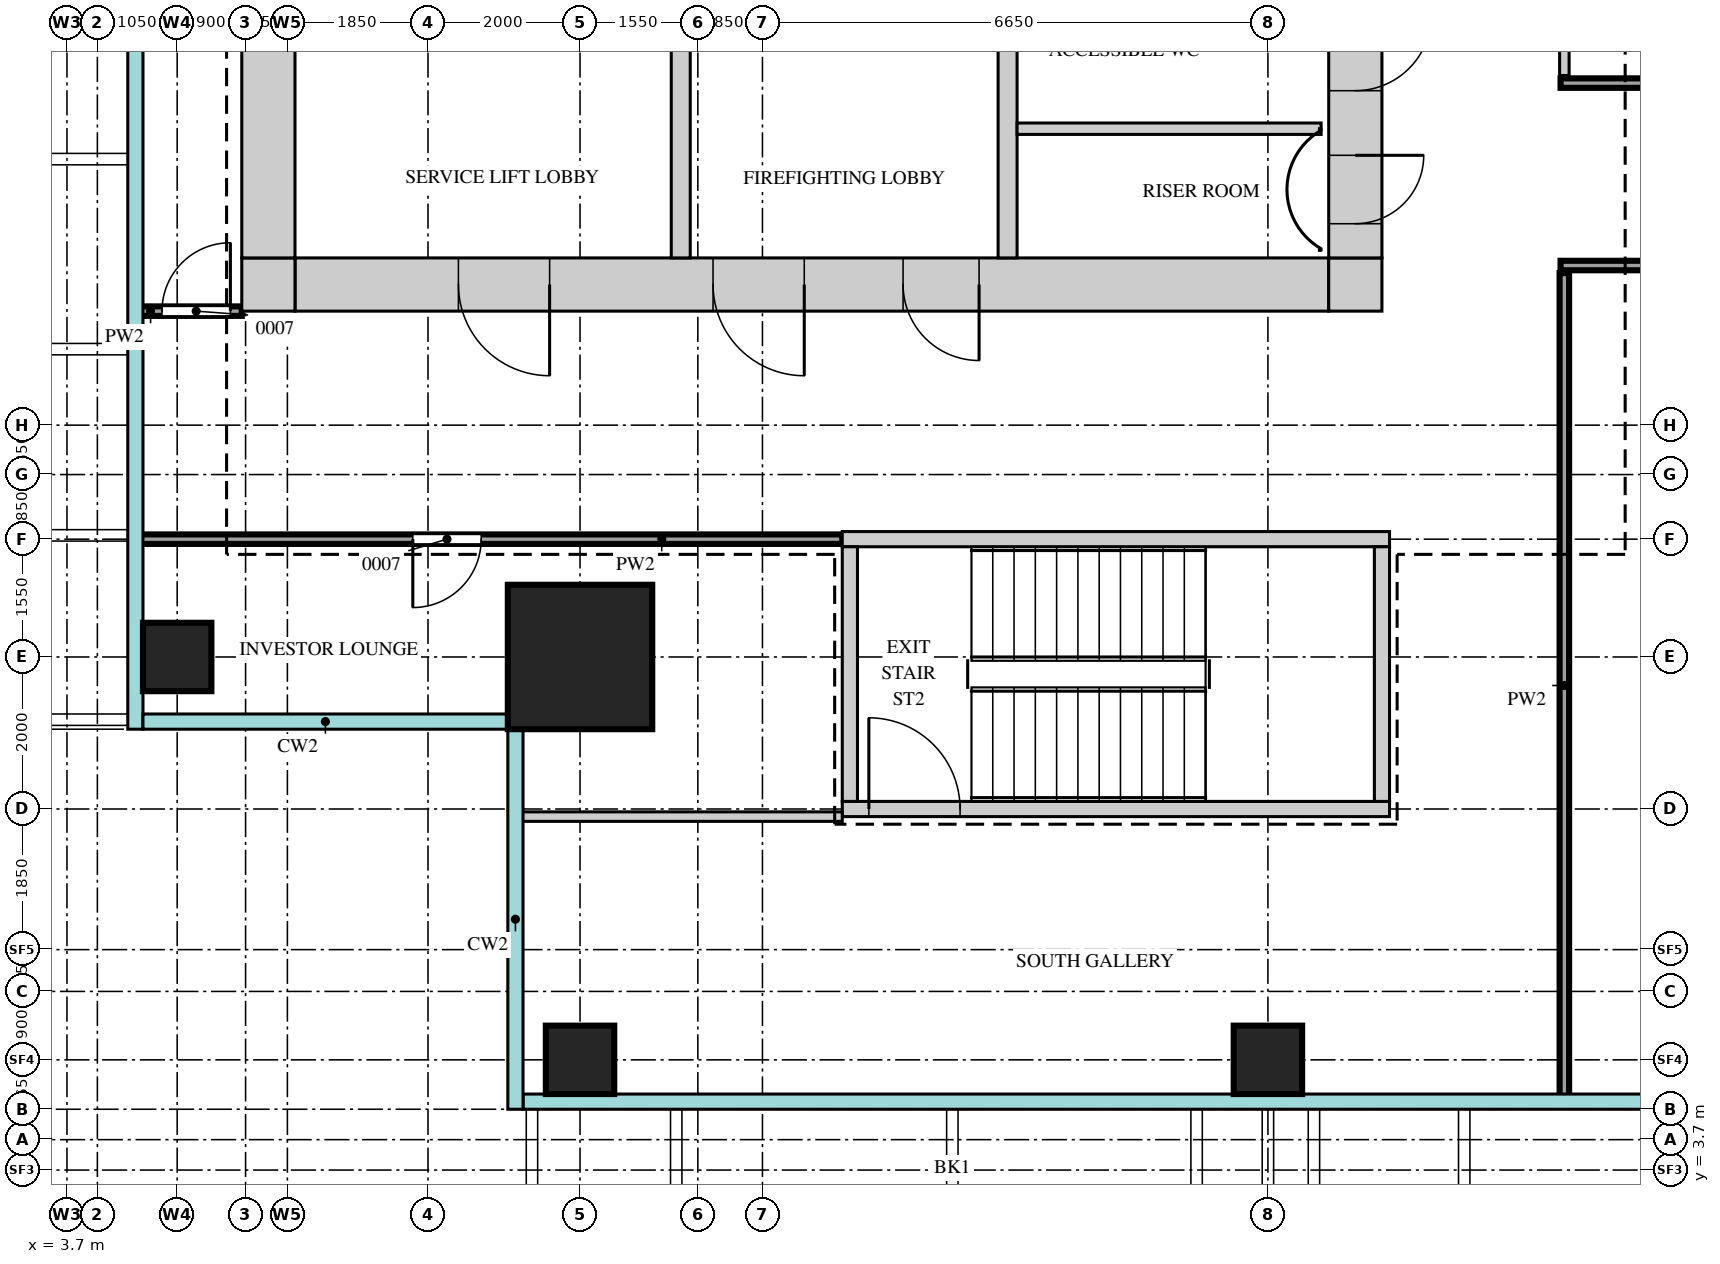
"""IFC4 building model, lengths in metres.
Left out: names, types, materials, properties, quantities, classifications, styles, units other than length and angle.
Written with IfcOpenShell. Run it as: python <this file> out.ifc"""

import sys

from ifc_helpers import new_model, si_unit, direction, frame, frame_2d, origin, origin_2d, place, context, subcontext, project, spatial, rectangle, extrude, source, transform, mapped, element, fill, save


model = new_model("IFC4")
c1 = context("Model", 3, precision=1e-05, world=origin(), true_north=direction((0.0, 1.0)))
c2 = subcontext(c1, "Body", "Model", "MODEL_VIEW")
j1 = project(units=[si_unit("LENGTHUNIT", "METRE"), si_unit("PLANEANGLEUNIT", "RADIAN")], contexts=[c1])
p1 = place(None, origin())
s1 = spatial("IfcSite", under=j1, at=p1, CompositionType="ELEMENT")
p2 = place(p1, origin())
s2 = spatial("IfcBuilding", under=s1, at=p2, CompositionType="ELEMENT")
p3 = place(p2, frame((0.0, 0.0, 234.2)))
s3 = spatial("IfcBuildingStorey", under=s2, at=p3, CompositionType="ELEMENT", Elevation=234.2)
m1 = source(origin(), c2, "Body", "SweptSolid", [
    extrude(rectangle(XDim=13.6, YDim=0.7, at=frame_2d((6.8, 0.0))), origin(), (0.0, 0.0, 1.0), 3.75),
])
p4 = place(p3, frame((6.7, 15.35, 0.0), z_axis=(0.0, 0.0, 1.0), x_axis=(1.0, 0.0, 0.0)))
e1 = element("IfcWall", 1, at=p4, inside=s3, PredefinedType="SHEAR", context=c2, shape_type="MappedRepresentation", body=[
    mapped(m1, transform((0.0, 0.0, 0.0))),
])
m2 = source(origin(), c2, "Body", "SweptSolid", [
    extrude(rectangle(XDim=1.2, YDim=2.1, at=frame_2d((0.6, 1.05))), frame((0.0, 0.36, 0.0), z_axis=(0.0, -1.0, 0.0), x_axis=(1.0, 0.0, 0.0)), (0.0, 0.0, 1.0), 0.72),
])
p5 = place(p4, frame((5.5, 0.0, 0.0)))
e2 = element("IfcOpeningElement", 2, at=p5, cuts=e1, PredefinedType="OPENING", context=c2, shape_type="MappedRepresentation", body=[
    mapped(m2, transform((0.0, 0.0, 0.0))),
])
p6 = place(p4, frame((2.15, 0.0, 0.0)))
e3 = element("IfcOpeningElement", 3, at=p6, cuts=e1, PredefinedType="OPENING", context=c2, shape_type="MappedRepresentation", body=[
    mapped(m2, transform((0.0, 0.0, 0.0))),
])
m3 = source(origin(), c2, "Body", "SweptSolid", [
    extrude(rectangle(XDim=1.0, YDim=2.1, at=frame_2d((0.5, 1.05))), frame((0.0, 0.36, 0.0), z_axis=(0.0, -1.0, 0.0), x_axis=(1.0, 0.0, 0.0)), (0.0, 0.0, 1.0), 0.72),
])
p7 = place(p4, frame((8.0, 0.0, 0.0)))
e4 = element("IfcOpeningElement", 4, at=p7, cuts=e1, PredefinedType="OPENING", context=c2, shape_type="MappedRepresentation", body=[
    mapped(m3, transform((0.0, 0.0, 0.0))),
])
m4 = source(origin(), c2, "Body", "SweptSolid", [
    extrude(rectangle(XDim=0.7, YDim=0.7, at=frame_2d((0.35, 0.0))), origin(), (0.0, 0.0, 1.0), 3.75),
])
for number, where, z_axis, x_axis in (
    (5, (20.3, 15.35, 0.0), (0.0, 0.0, 1.0), (1.0, 0.0, 0.0)),
    (6, (6.0, 15.35, 0.0), (0.0, 0.0, 1.0), (1.0, 0.0, 0.0)),
):
    element("IfcWall", number, at=place(p3, frame(where, z_axis=z_axis, x_axis=x_axis)), inside=s3, PredefinedType="SHEAR", context=c2, shape_type="MappedRepresentation", body=[
        mapped(m4, transform((0.0, 0.0, 0.0))),
    ])
m5 = source(origin(), c2, "Body", "SweptSolid", [
    extrude(rectangle(XDim=22.6, YDim=0.7, at=frame_2d((11.3, 0.0))), origin(), (0.0, 0.0, 1.0), 3.75),
])
p8 = place(p3, frame((20.65, 15.7, 0.0), z_axis=(0.0, 0.0, 1.0), x_axis=(0.0, 1.0, 0.0)))
e7 = element("IfcWall", 7, at=p8, inside=s3, PredefinedType="SHEAR", context=c2, shape_type="MappedRepresentation", body=[
    mapped(m5, transform((0.0, 0.0, 0.0))),
])
m6 = source(origin(), c2, "Body", "SweptSolid", [
    extrude(rectangle(XDim=1.8, YDim=2.1, at=frame_2d((0.9, 1.05))), frame((0.0, 0.36, 0.0), z_axis=(0.0, -1.0, 0.0), x_axis=(1.0, 0.0, 0.0)), (0.0, 0.0, 1.0), 0.72),
])
p9 = place(p8, frame((10.8, 0.0, 0.0)))
e8 = element("IfcOpeningElement", 8, at=p9, cuts=e7, PredefinedType="OPENING", context=c2, shape_type="MappedRepresentation", body=[
    mapped(m6, transform((0.0, 0.0, 0.0))),
])
m7 = source(origin(), c2, "Body", "SweptSolid", [
    extrude(rectangle(XDim=0.9, YDim=2.1, at=frame_2d((0.45, 1.05))), frame((0.0, 0.36, 0.0), z_axis=(0.0, -1.0, 0.0), x_axis=(1.0, 0.0, 0.0)), (0.0, 0.0, 1.0), 0.72),
])
p10 = place(p8, frame((0.45, 0.0, 0.0)))
e9 = element("IfcOpeningElement", 9, at=p10, cuts=e7, PredefinedType="OPENING", context=c2, shape_type="MappedRepresentation", body=[
    mapped(m7, transform((0.0, 0.0, 0.0))),
])
p11 = place(p8, frame((2.2, 0.0, 0.0)))
e10 = element("IfcOpeningElement", 10, at=p11, cuts=e7, PredefinedType="OPENING", context=c2, shape_type="MappedRepresentation", body=[
    mapped(m3, transform((0.0, 0.0, 0.0))),
])
p12 = place(p8, frame((5.0, 0.0, 0.0)))
e11 = element("IfcOpeningElement", 11, at=p12, cuts=e7, PredefinedType="OPENING", context=c2, shape_type="MappedRepresentation", body=[
    mapped(m7, transform((0.0, 0.0, 0.0))),
])
p13 = place(p3, frame((6.35, 15.7, 0.0), z_axis=(0.0, 0.0, 1.0), x_axis=(0.0, 1.0, 0.0)))
e12 = element("IfcWall", 12, at=p13, inside=s3, PredefinedType="SHEAR", context=c2, shape_type="MappedRepresentation", body=[
    mapped(m5, transform((0.0, 0.0, 0.0))),
])
m8 = source(origin(), c2, "Body", "SweptSolid", [
    extrude(rectangle(XDim=7.2, YDim=0.2, at=frame_2d((3.6, 0.0))), origin(), (0.0, 0.0, 1.0), 3.75),
])
p14 = place(p3, frame((13.9, 12.0, 0.0), z_axis=(0.0, 0.0, 1.0), x_axis=(1.0, 0.0, 0.0)))
e13 = element("IfcWall", 13, at=p14, inside=s3, PredefinedType="SHEAR", context=c2, shape_type="MappedRepresentation", body=[
    mapped(m8, transform((0.0, 0.0, 0.0))),
])
p15 = place(p3, frame((13.9, 8.45, 0.0), z_axis=(0.0, 0.0, 1.0), x_axis=(1.0, 0.0, 0.0)))
e14 = element("IfcWall", 14, at=p15, inside=s3, PredefinedType="SHEAR", context=c2, shape_type="MappedRepresentation", body=[
    mapped(m8, transform((0.0, 0.0, 0.0))),
])
m9 = source(origin(), c2, "Body", "SweptSolid", [
    extrude(rectangle(XDim=1.2, YDim=2.1, at=frame_2d((0.6, 1.05))), frame((0.0, 0.11, 0.0), z_axis=(0.0, -1.0, 0.0), x_axis=(1.0, 0.0, 0.0)), (0.0, 0.0, 1.0), 0.22),
])
p16 = place(p15, frame((0.35, 0.0, 0.0)))
e15 = element("IfcOpeningElement", 15, at=p16, cuts=e14, PredefinedType="OPENING", context=c2, shape_type="MappedRepresentation", body=[
    mapped(m9, transform((0.0, 0.0, 0.0))),
])
m10 = source(origin(), c2, "Body", "SweptSolid", [
    extrude(rectangle(XDim=3.35, YDim=0.2, at=frame_2d((1.675, 0.0))), origin(), (0.0, 0.0, 1.0), 3.75),
])
for number, where, z_axis, x_axis in (
    (16, (21.0, 8.55, 0.0), (0.0, 0.0, 1.0), (0.0, 1.0, 0.0)),
    (17, (14.0, 8.55, 0.0), (0.0, 0.0, 1.0), (0.0, 1.0, 0.0)),
):
    element("IfcWall", number, at=place(p3, frame(where, z_axis=z_axis, x_axis=x_axis)), inside=s3, PredefinedType="SHEAR", context=c2, shape_type="MappedRepresentation", body=[
        mapped(m10, transform((0.0, 0.0, 0.0))),
    ])
m11 = source(origin(), c2, "Body", "SweptSolid", [
    extrude(rectangle(XDim=3.5, YDim=0.25, at=frame_2d((1.75, 0.0))), origin(), (0.0, 0.0, 1.0), 3.75),
])
for number, where, z_axis, x_axis in (
    (18, (16.075, 15.7, 0.0), (0.0, 0.0, 1.0), (0.0, 1.0, 0.0)),
    (19, (11.775, 15.7, 0.0), (0.0, 0.0, 1.0), (0.0, 1.0, 0.0)),
):
    element("IfcWall", number, at=place(p3, frame(where, z_axis=z_axis, x_axis=x_axis)), inside=s3, PredefinedType="STANDARD", context=c2, shape_type="MappedRepresentation", body=[
        mapped(m11, transform((0.0, 0.0, 0.0))),
    ])
m12 = source(origin(), c2, "Body", "SweptSolid", [
    extrude(rectangle(XDim=1.9, YDim=1.9, at=origin_2d()), origin(), (0.0, 0.0, 1.0), 4.0),
])
p17 = place(p3, frame((10.45, 10.45, 0.0), z_axis=(0.0, 0.0, 1.0), x_axis=(1.0, 0.0, 0.0)))
e20 = element("IfcColumn", 20, at=p17, inside=s3, PredefinedType="COLUMN", context=c2, shape_type="MappedRepresentation", body=[
    mapped(m12, transform((0.0, 0.0, 0.0))),
])
m13 = source(origin(), c2, "Body", "SweptSolid", [
    extrude(rectangle(XDim=0.9, YDim=0.9, at=origin_2d()), origin(), (0.0, 0.0, 1.0), 3.75),
])
for number, where, z_axis, x_axis in (
    (21, (10.45, 5.15, 0.0), (0.0, 0.0, 1.0), (1.0, 0.0, 0.0)),
    (22, (19.5, 5.15, 0.0), (0.0, 0.0, 1.0), (1.0, 0.0, 0.0)),
    (23, (5.15, 10.45, 0.0), (0.0, 0.0, 1.0), (1.0, 0.0, 0.0)),
):
    element("IfcColumn", number, at=place(p3, frame(where, z_axis=z_axis, x_axis=x_axis)), inside=s3, PredefinedType="COLUMN", context=c2, shape_type="MappedRepresentation", body=[
        mapped(m13, transform((0.0, 0.0, 0.0))),
    ])
m14 = source(origin(), c2, "Body", "SweptSolid", [
    extrude(rectangle(XDim=10.85, YDim=0.125, at=frame_2d((5.425, 0.0))), origin(), (0.0, 0.0, 1.0), 3.8),
])
p18 = place(p3, frame((23.4, 4.65, 0.0), z_axis=(0.0, 0.0, 1.0), x_axis=(0.0, 1.0, 0.0)))
e24 = element("IfcWall", 24, at=p18, inside=s3, PredefinedType="PARTITIONING", context=c2, shape_type="MappedRepresentation", body=[
    mapped(m14, transform((0.0, 0.0, 0.0))),
])
m15 = source(origin(), c2, "Body", "SweptSolid", [
    extrude(rectangle(XDim=4.25, YDim=0.125, at=frame_2d((2.125, 0.0))), origin(), (0.0, 0.0, 1.0), 3.8),
])
p19 = place(p3, frame((9.65, 8.35, 0.0), z_axis=(0.0, 0.0, 1.0), x_axis=(1.0, 0.0, 0.0)))
e25 = element("IfcWall", 25, at=p19, inside=s3, PredefinedType="PARTITIONING", context=c2, shape_type="MappedRepresentation", body=[
    mapped(m15, transform((0.0, 0.0, 0.0))),
])
m16 = source(origin(), c2, "Body", "SweptSolid", [
    extrude(rectangle(XDim=9.25, YDim=0.125, at=frame_2d((4.625, 0.0))), origin(), (0.0, 0.0, 1.0), 3.8),
])
p20 = place(p3, frame((4.65, 12.0, 0.0), z_axis=(0.0, 0.0, 1.0), x_axis=(1.0, 0.0, 0.0)))
e26 = element("IfcWall", 26, at=p20, inside=s3, PredefinedType="PARTITIONING", context=c2, shape_type="MappedRepresentation", body=[
    mapped(m16, transform((0.0, 0.0, 0.0))),
])
m17 = source(origin(), c2, "Body", "SweptSolid", [
    extrude(rectangle(XDim=0.9, YDim=2.1, at=frame_2d((0.45, 1.05))), frame((0.0, 0.073, 0.0), z_axis=(0.0, -1.0, 0.0), x_axis=(1.0, 0.0, 0.0)), (0.0, 0.0, 1.0), 0.145),
])
p21 = place(p20, frame((3.6, 0.0, 0.0)))
e27 = element("IfcOpeningElement", 27, at=p21, cuts=e26, PredefinedType="OPENING", context=c2, shape_type="MappedRepresentation", body=[
    mapped(m17, transform((0.0, 0.0, 0.0))),
])
m18 = source(origin(), c2, "Body", "SweptSolid", [
    extrude(rectangle(XDim=1.35, YDim=0.125, at=frame_2d((0.675, 0.0))), origin(), (0.0, 0.0, 1.0), 3.8),
])
p22 = place(p3, frame((4.65, 15.0, 0.0), z_axis=(0.0, 0.0, 1.0), x_axis=(1.0, 0.0, 0.0)))
e28 = element("IfcWall", 28, at=p22, inside=s3, PredefinedType="PARTITIONING", context=c2, shape_type="MappedRepresentation", body=[
    mapped(m18, transform((0.0, 0.0, 0.0))),
])
p23 = place(p22, frame((0.3, 0.0, 0.0)))
e29 = element("IfcOpeningElement", 29, at=p23, cuts=e28, PredefinedType="OPENING", context=c2, shape_type="MappedRepresentation", body=[
    mapped(m17, transform((0.0, 0.0, 0.0))),
])
m19 = source(origin(), c2, "Body", "SweptSolid", [
    extrude(rectangle(XDim=26.0, YDim=0.125, at=frame_2d((13.0, 0.0))), origin(), (0.0, 0.0, 1.0), 3.8),
])
p24 = place(p3, frame((23.35, 15.6, 0.0), z_axis=(0.0, 0.0, 1.0), x_axis=(1.0, 0.0, 0.0)))
e30 = element("IfcWall", 30, at=p24, inside=s3, PredefinedType="PARTITIONING", context=c2, shape_type="MappedRepresentation", body=[
    mapped(m19, transform((0.0, 0.0, 0.0))),
])
m20 = source(origin(), c2, "Body", "SweptSolid", [
    extrude(rectangle(XDim=1.2, YDim=2.1, at=frame_2d((0.6, 1.05))), frame((0.0, 0.073, 0.0), z_axis=(0.0, -1.0, 0.0), x_axis=(1.0, 0.0, 0.0)), (0.0, 0.0, 1.0), 0.145),
])
p25 = place(p24, frame((5.0, 0.0, 0.0)))
e31 = element("IfcOpeningElement", 31, at=p25, cuts=e30, PredefinedType="OPENING", context=c2, shape_type="MappedRepresentation", body=[
    mapped(m20, transform((0.0, 0.0, 0.0))),
])
p26 = place(p24, frame((15.1, 0.0, 0.0)))
e32 = element("IfcOpeningElement", 32, at=p26, cuts=e30, PredefinedType="OPENING", context=c2, shape_type="MappedRepresentation", body=[
    mapped(m17, transform((0.0, 0.0, 0.0))),
])
p27 = place(p24, frame((22.6, 0.0, 0.0)))
e33 = element("IfcOpeningElement", 33, at=p27, cuts=e30, PredefinedType="OPENING", context=c2, shape_type="MappedRepresentation", body=[
    mapped(m17, transform((0.0, 0.0, 0.0))),
])
m21 = source(origin(), c2, "Body", "SweptSolid", [
    extrude(rectangle(XDim=4.0, YDim=0.15, at=frame_2d((2.0, 0.0))), origin(), (0.0, 0.0, 1.0), 3.8),
])
p28 = place(p3, frame((16.2, 17.4, 0.0), z_axis=(0.0, 0.0, 1.0), x_axis=(1.0, 0.0, 0.0)))
e34 = element("IfcWall", 34, at=p28, inside=s3, PredefinedType="PARTITIONING", context=c2, shape_type="MappedRepresentation", body=[
    mapped(m21, transform((0.0, 0.0, 0.0))),
])
p29 = place(p3, frame((23.35, 18.0, 0.0), z_axis=(0.0, 0.0, 1.0), x_axis=(1.0, 0.0, 0.0)))
e35 = element("IfcWall", 35, at=p29, inside=s3, PredefinedType="PARTITIONING", context=c2, shape_type="MappedRepresentation", body=[
    mapped(m19, transform((0.0, 0.0, 0.0))),
])
p30 = place(p29, frame((4.05, 0.0, 0.0)))
e36 = element("IfcOpeningElement", 36, at=p30, cuts=e35, PredefinedType="OPENING", context=c2, shape_type="MappedRepresentation", body=[
    mapped(m17, transform((0.0, 0.0, 0.0))),
])
m22 = source(origin(), c2, "Body", "SweptSolid", [
    extrude(rectangle(XDim=1.0, YDim=2.1, at=frame_2d((0.5, 1.05))), frame((0.0, 0.073, 0.0), z_axis=(0.0, -1.0, 0.0), x_axis=(1.0, 0.0, 0.0)), (0.0, 0.0, 1.0), 0.145),
])
p31 = place(p29, frame((7.4, 0.0, 0.0)))
e37 = element("IfcOpeningElement", 37, at=p31, cuts=e35, PredefinedType="OPENING", context=c2, shape_type="MappedRepresentation", body=[
    mapped(m22, transform((0.0, 0.0, 0.0))),
])
p32 = place(p29, frame((12.55, 0.0, 0.0)))
e38 = element("IfcOpeningElement", 38, at=p32, cuts=e35, PredefinedType="OPENING", context=c2, shape_type="MappedRepresentation", body=[
    mapped(m17, transform((0.0, 0.0, 0.0))),
])
p33 = place(p29, frame((20.8, 0.0, 0.0)))
e39 = element("IfcOpeningElement", 39, at=p33, cuts=e35, PredefinedType="OPENING", context=c2, shape_type="MappedRepresentation", body=[
    mapped(m17, transform((0.0, 0.0, 0.0))),
])
m23 = source(origin(), c2, "Body", "SweptSolid", [
    extrude(rectangle(XDim=6.8, YDim=0.125, at=frame_2d((3.4, 0.0))), origin(), (0.0, 0.0, 1.0), 3.8),
])
p34 = place(p3, frame((23.4, 18.1, 0.0), z_axis=(0.0, 0.0, 1.0), x_axis=(0.0, 1.0, 0.0)))
e40 = element("IfcWall", 40, at=p34, inside=s3, PredefinedType="PARTITIONING", context=c2, shape_type="MappedRepresentation", body=[
    mapped(m23, transform((0.0, 0.0, 0.0))),
])
p35 = place(p34, frame((2.8, 0.0, 0.0)))
e41 = element("IfcOpeningElement", 41, at=p35, cuts=e40, PredefinedType="OPENING", context=c2, shape_type="MappedRepresentation", body=[
    mapped(m17, transform((0.0, 0.0, 0.0))),
])
m24 = source(origin(), c2, "Body", "SweptSolid", [
    extrude(rectangle(XDim=0.9, YDim=2.1, at=frame_2d((0.45, 1.05))), frame((0.0, 0.3, 0.0), z_axis=(0.0, -1.0, 0.0), x_axis=(1.0, 0.0, 0.0)), (0.0, 0.0, 1.0), 0.6),
])
p36 = place(p10, origin())
e42 = element("IfcDoor", 42, at=p36, inside=s3, OperationType="SINGLE_SWING_RIGHT", PredefinedType="DOOR", context=c2, shape_type="MappedRepresentation", body=[
    mapped(m24, transform((0.0, 0.0, 0.0))),
])
fill(e9, e42)
m25 = source(origin(), c2, "Body", "SweptSolid", [
    extrude(rectangle(XDim=1.0, YDim=2.1, at=frame_2d((0.5, 1.05))), frame((0.0, 0.3, 0.0), z_axis=(0.0, -1.0, 0.0), x_axis=(1.0, 0.0, 0.0)), (0.0, 0.0, 1.0), 0.6),
])
p37 = place(p11, origin())
e43 = element("IfcDoor", 43, at=p37, inside=s3, OperationType="SINGLE_SWING_RIGHT", PredefinedType="DOOR", context=c2, shape_type="MappedRepresentation", body=[
    mapped(m25, transform((0.0, 0.0, 0.0))),
])
fill(e10, e43)
m26 = source(origin(), c2, "Body", "SweptSolid", [
    extrude(rectangle(XDim=1.2, YDim=2.1, at=frame_2d((0.6, 1.05))), frame((0.0, 0.3, 0.0), z_axis=(0.0, -1.0, 0.0), x_axis=(1.0, 0.0, 0.0)), (0.0, 0.0, 1.0), 0.6),
])
p38 = place(p5, origin())
e44 = element("IfcDoor", 44, at=p38, inside=s3, OperationType="SINGLE_SWING_RIGHT", PredefinedType="DOOR", context=c2, shape_type="MappedRepresentation", body=[
    mapped(m26, transform((0.0, 0.0, 0.0))),
])
fill(e2, e44)
p39 = place(p6, origin())
e45 = element("IfcDoor", 45, at=p39, inside=s3, OperationType="SINGLE_SWING_RIGHT", PredefinedType="DOOR", context=c2, shape_type="MappedRepresentation", body=[
    mapped(m26, transform((0.0, 0.0, 0.0))),
])
fill(e3, e45)
p40 = place(p7, origin())
e46 = element("IfcDoor", 46, at=p40, inside=s3, OperationType="SINGLE_SWING_RIGHT", PredefinedType="DOOR", context=c2, shape_type="MappedRepresentation", body=[
    mapped(m25, transform((0.0, 0.0, 0.0))),
])
fill(e4, e46)
m27 = source(origin(), c2, "Body", "SweptSolid", [
    extrude(rectangle(XDim=0.9, YDim=2.1, at=frame_2d((0.45, 1.05))), frame((0.0, 0.025, 0.0), z_axis=(0.0, -1.0, 0.0), x_axis=(1.0, 0.0, 0.0)), (0.0, 0.0, 1.0), 0.05),
])
p41 = place(p23, origin())
e47 = element("IfcDoor", 47, at=p41, inside=s3, OperationType="SINGLE_SWING_LEFT", PredefinedType="DOOR", context=c2, shape_type="MappedRepresentation", body=[
    mapped(m27, transform((0.0, 0.0, 0.0))),
])
fill(e29, e47)
p42 = place(p21, origin())
e48 = element("IfcDoor", 48, at=p42, inside=s3, OperationType="SINGLE_SWING_LEFT", PredefinedType="DOOR", context=c2, shape_type="MappedRepresentation", body=[
    mapped(m27, transform((0.0, 0.0, 0.0))),
])
fill(e27, e48)
m28 = source(origin(), c2, "Body", "SweptSolid", [
    extrude(rectangle(XDim=1.2, YDim=2.1, at=frame_2d((0.6, 1.05))), frame((0.0, 0.025, 0.0), z_axis=(0.0, -1.0, 0.0), x_axis=(1.0, 0.0, 0.0)), (0.0, 0.0, 1.0), 0.05),
])
p43 = place(p16, origin())
e49 = element("IfcDoor", 49, at=p43, inside=s3, OperationType="SINGLE_SWING_RIGHT", PredefinedType="DOOR", context=c2, shape_type="MappedRepresentation", body=[
    mapped(m28, transform((0.0, 0.0, 0.0))),
])
fill(e15, e49)
save(model, sys.argv[1])
